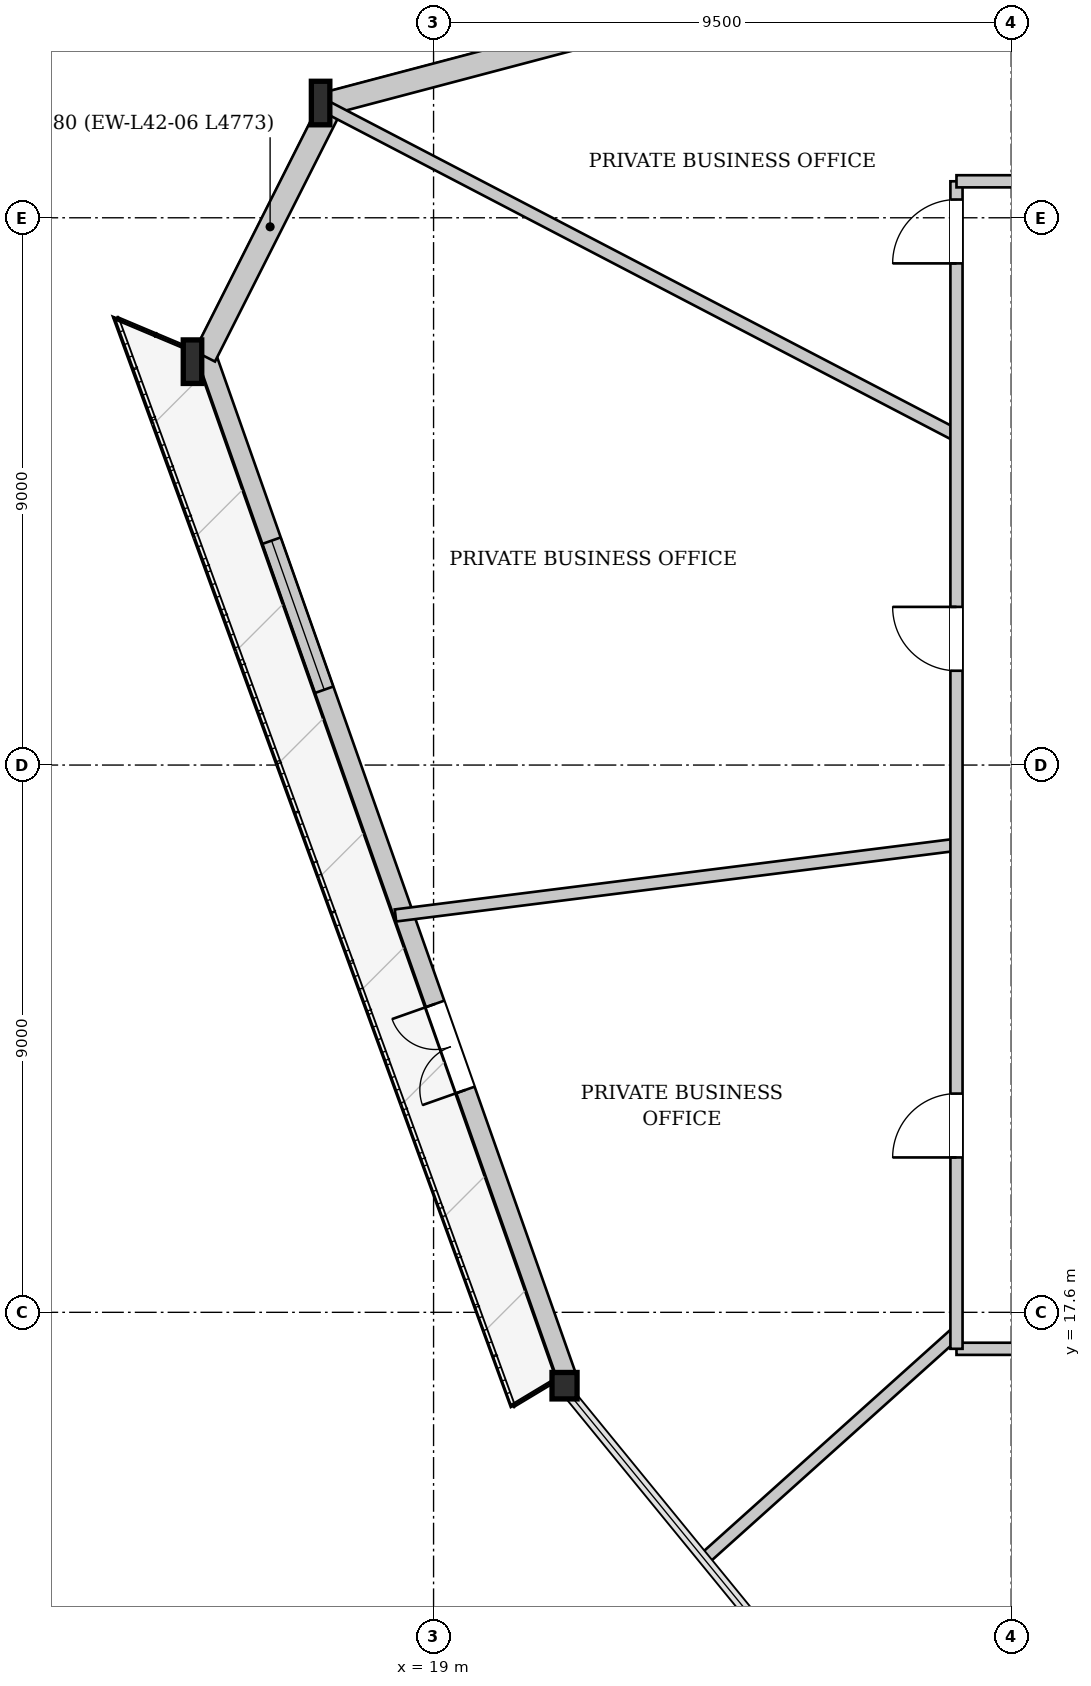
"""IFC4 building model, lengths in metres.
Left out: names, types, materials, properties, quantities, classifications, styles, units other than length and angle.
Written with IfcOpenShell. Run it as: python <this file> out.ifc"""

import sys

from ifc_helpers import new_model, si_unit, direction, frame, frame_2d, origin, origin_2d, place, context, subcontext, project, spatial, rectangle, i_section, extrude, source, transform, mapped, element, fill, save


model = new_model("IFC4")
c1 = context("Model", 3, precision=1e-05, world=origin(), true_north=direction((0.0, 1.0)))
c2 = subcontext(c1, "Body", "Model", "MODEL_VIEW")
j1 = project(units=[si_unit("LENGTHUNIT", "METRE"), si_unit("PLANEANGLEUNIT", "RADIAN")], contexts=[c1])
p1 = place(None, origin())
s1 = spatial("IfcSite", under=j1, at=p1, CompositionType="ELEMENT")
p2 = place(p1, origin())
s2 = spatial("IfcBuilding", under=s1, at=p2, CompositionType="ELEMENT")
p3 = place(p2, frame((0.0, 0.0, 160.8)))
s3 = spatial("IfcBuildingStorey", under=s2, at=p3, CompositionType="ELEMENT", Elevation=160.8)
m1 = source(origin(), c2, "Body", "SweptSolid", [
    extrude(i_section(OverallWidth=0.304, OverallDepth=0.716, WebThickness=0.021, FlangeThickness=0.04, at=origin_2d()), origin(), (0.0, 0.0, 1.0), 3.408),
])
p4 = place(p3, frame((17.218, 37.667, 0.0), z_axis=(-0.044563769491, -0.105964332922, 0.993370842434), x_axis=(0.92179953957, -0.38766687871, 0.0)))
e1 = element("IfcColumn", 1, at=p4, inside=s3, PredefinedType="COLUMN", context=c2, shape_type="MappedRepresentation", body=[
    mapped(m1, transform((0.0, 0.0, 0.0), x_axis=(1.0, 0.0, 0.0), y_axis=(0.0, 1.0, 0.0), z_axis=(0.0, 0.0, 1.0), scale=1.0)),
])
m2 = source(origin(), c2, "Body", "SweptSolid", [
    extrude(i_section(OverallWidth=0.304, OverallDepth=0.716, WebThickness=0.021, FlangeThickness=0.04, at=origin_2d()), origin(), (0.0, 0.0, 1.0), 3.403),
])
p5 = place(p3, frame((15.066, 33.407, 0.0), z_axis=(-0.018149442813, -0.101866437921, 0.994632508292), x_axis=(0.984496060055, -0.17540669239, 0.0)))
e2 = element("IfcColumn", 2, at=p5, inside=s3, PredefinedType="COLUMN", context=c2, shape_type="MappedRepresentation", body=[
    mapped(m2, transform((0.0, 0.0, 0.0), x_axis=(1.0, 0.0, 0.0), y_axis=(0.0, 1.0, 0.0), z_axis=(0.0, 0.0, 1.0), scale=1.0)),
])
m3 = source(origin(), c2, "Body", "SweptSolid", [
    extrude(i_section(OverallWidth=0.412, OverallDepth=0.435, WebThickness=0.031, FlangeThickness=0.05, at=origin_2d()), origin(), (0.0, 0.0, 1.0), 3.401),
])
p6 = place(p3, frame((21.033, 16.502, 0.0), z_axis=(0.071005167008, -0.063753880994, 0.995436441425), x_axis=(0.668091372088, 0.744079242112, 0.0)))
e3 = element("IfcColumn", 3, at=p6, inside=s3, PredefinedType="COLUMN", context=c2, shape_type="MappedRepresentation", body=[
    mapped(m3, transform((0.0, 0.0, 0.0), x_axis=(1.0, 0.0, 0.0), y_axis=(0.0, 1.0, 0.0), z_axis=(0.0, 0.0, 1.0), scale=1.0)),
])
p7 = place(p3, frame((21.184, 16.555, 0.0), z_axis=(0.0, 0.0, 1.0), x_axis=(-0.332843624825, 0.942982036634, 0.0)))
e4 = element("IfcWall", 4, at=p7, inside=s3, PredefinedType="SOLIDWALL", context=c2, shape_type="SweptSolid", body=[
    extrude(rectangle(XDim=17.927, YDim=0.32, at=frame_2d((8.964, 0.0))), origin(), (0.0, 0.0, 1.0), 2.722),
])
p8 = place(p7, frame((4.987, 0.0, 0.0)))
e5 = element("IfcOpeningElement", 5, at=p8, cuts=e4, PredefinedType="OPENING", context=c2, shape_type="SweptSolid", body=[
    extrude(rectangle(XDim=1.5, YDim=2.3, at=frame_2d((0.75, 1.15))), frame((0.0, 0.17, 0.0), z_axis=(0.0, -1.0, 0.0), x_axis=(1.0, 0.0, 0.0)), (0.0, 0.0, 1.0), 0.34),
])
p9 = place(p7, frame((11.966, 0.0, 0.252)))
e6 = element("IfcOpeningElement", 6, at=p9, cuts=e4, PredefinedType="OPENING", context=c2, shape_type="SweptSolid", body=[
    extrude(rectangle(XDim=2.6, YDim=2.35, at=frame_2d((1.3, 1.175))), frame((0.0, 0.17, 0.0), z_axis=(0.0, -1.0, 0.0), x_axis=(1.0, 0.0, 0.0)), (0.0, 0.0, 1.0), 0.34),
])
p10 = place(p3, frame((15.236, 33.321, 0.0), z_axis=(0.0, 0.0, 1.0), x_axis=(0.450831311433, 0.892609169028, 0.0)))
e7 = element("IfcWall", 7, at=p10, inside=s3, PredefinedType="SOLIDWALL", context=c2, shape_type="SweptSolid", body=[
    extrude(rectangle(XDim=4.773, YDim=0.38, at=frame_2d((2.387, 0.0))), origin(), (0.0, 0.0, 1.0), 2.722),
])
p11 = place(p3, frame((17.267, 37.484, 0.0), z_axis=(0.0, 0.0, 1.0), x_axis=(0.966875026681, 0.255250235613, 0.0)))
e8 = element("IfcWall", 8, at=p11, inside=s3, PredefinedType="SOLIDWALL", context=c2, shape_type="SweptSolid", body=[
    extrude(rectangle(XDim=22.923, YDim=0.38, at=frame_2d((11.461, 0.0))), origin(), (0.0, 0.0, 1.0), 2.722),
])
p12 = place(p11, frame((5.318, 0.0, 0.352)))
e9 = element("IfcOpeningElement", 9, at=p12, cuts=e8, PredefinedType="OPENING", context=c2, shape_type="SweptSolid", body=[
    extrude(rectangle(XDim=2.2, YDim=2.25, at=frame_2d((1.1, 1.125))), frame((0.0, 0.2, 0.0), z_axis=(0.0, -1.0, 0.0), x_axis=(1.0, 0.0, 0.0)), (0.0, 0.0, 1.0), 0.4),
])
p13 = place(p11, frame((15.405, 0.0, 0.352)))
e10 = element("IfcOpeningElement", 10, at=p13, cuts=e8, PredefinedType="OPENING", context=c2, shape_type="SweptSolid", body=[
    extrude(rectangle(XDim=2.2, YDim=2.25, at=frame_2d((1.1, 1.125))), frame((0.0, 0.2, 0.0), z_axis=(0.0, -1.0, 0.0), x_axis=(1.0, 0.0, 0.0)), (0.0, 0.0, 1.0), 0.4),
])
p14 = place(p3, frame((27.6, 32.023, 0.0), z_axis=(0.0, 0.0, 1.0), x_axis=(-0.886710795581, 0.462324523468, 0.0)))
e11 = element("IfcWall", 11, at=p14, inside=s3, PredefinedType="PARTITIONING", context=c2, shape_type="SweptSolid", body=[
    extrude(rectangle(XDim=11.783, YDim=0.2, at=frame_2d((5.892, 0.0))), origin(), (0.0, 0.0, 1.0), 2.925),
])
p15 = place(p3, frame((27.6, 25.289, 0.0), z_axis=(0.0, 0.0, 1.0), x_axis=(-0.992150939971, -0.125046040779, 0.0)))
e12 = element("IfcWall", 12, at=p15, inside=s3, PredefinedType="PARTITIONING", context=c2, shape_type="SweptSolid", body=[
    extrude(rectangle(XDim=9.299, YDim=0.2, at=frame_2d((4.65, 0.0))), origin(), (0.0, 0.0, 1.0), 3.33),
])
p16 = place(p3, frame((27.6, 17.267, 0.0), z_axis=(0.0, 0.0, 1.0), x_axis=(-0.744269781278, -0.667879100344, 0.0)))
e13 = element("IfcWall", 13, at=p16, inside=s3, PredefinedType="PARTITIONING", context=c2, shape_type="SweptSolid", body=[
    extrude(rectangle(XDim=5.545, YDim=0.2, at=frame_2d((2.772, 0.0))), origin(), (0.0, 0.0, 1.0), 3.33),
])
p17 = place(p3, frame((27.6, 17.0, 0.0), z_axis=(0.0, 0.0, 1.0), x_axis=(1.0, 0.0, 0.0)))
e14 = element("IfcWall", 14, at=p17, inside=s3, PredefinedType="PARTITIONING", context=c2, shape_type="SweptSolid", body=[
    extrude(rectangle(XDim=20.8, YDim=0.2, at=frame_2d((10.4, 0.0))), origin(), (0.0, 0.0, 1.0), 3.33),
])
p18 = place(p17, frame((2.746, 0.0, 0.0)))
e15 = element("IfcOpeningElement", 15, at=p18, cuts=e14, PredefinedType="OPENING", context=c2, shape_type="SweptSolid", body=[
    extrude(rectangle(XDim=1.05, YDim=2.2, at=frame_2d((0.525, 1.1))), frame((0.0, 0.11, 0.0), z_axis=(0.0, -1.0, 0.0), x_axis=(1.0, 0.0, 0.0)), (0.0, 0.0, 1.0), 0.22),
])
p19 = place(p17, frame((9.339, 0.0, 0.0)))
e16 = element("IfcOpeningElement", 16, at=p19, cuts=e14, PredefinedType="OPENING", context=c2, shape_type="SweptSolid", body=[
    extrude(rectangle(XDim=1.05, YDim=2.2, at=frame_2d((0.525, 1.1))), frame((0.0, 0.11, 0.0), z_axis=(0.0, -1.0, 0.0), x_axis=(1.0, 0.0, 0.0)), (0.0, 0.0, 1.0), 0.22),
])
p20 = place(p17, frame((19.091, 0.0, 0.0)))
e17 = element("IfcOpeningElement", 17, at=p20, cuts=e14, PredefinedType="OPENING", context=c2, shape_type="SweptSolid", body=[
    extrude(rectangle(XDim=1.05, YDim=2.2, at=frame_2d((0.525, 1.1))), frame((0.0, 0.11, 0.0), z_axis=(0.0, -1.0, 0.0), x_axis=(1.0, 0.0, 0.0)), (0.0, 0.0, 1.0), 0.22),
])
p21 = place(p3, frame((27.6, 17.0, 0.0), z_axis=(0.0, 0.0, 1.0), x_axis=(0.0, 1.0, 0.0)))
e18 = element("IfcWall", 18, at=p21, inside=s3, PredefinedType="PARTITIONING", context=c2, shape_type="SweptSolid", body=[
    extrude(rectangle(XDim=19.2, YDim=0.2, at=frame_2d((9.6, 0.0))), origin(), (0.0, 0.0, 1.0), 3.33),
])
p22 = place(p21, frame((17.85, 0.0, 0.0)))
e19 = element("IfcOpeningElement", 19, at=p22, cuts=e18, PredefinedType="OPENING", context=c2, shape_type="SweptSolid", body=[
    extrude(rectangle(XDim=1.05, YDim=2.2, at=frame_2d((0.525, 1.1))), frame((0.0, 0.11, 0.0), z_axis=(0.0, -1.0, 0.0), x_axis=(1.0, 0.0, 0.0)), (0.0, 0.0, 1.0), 0.22),
])
p23 = place(p21, frame((11.151, 0.0, 0.0)))
e20 = element("IfcOpeningElement", 20, at=p23, cuts=e18, PredefinedType="OPENING", context=c2, shape_type="SweptSolid", body=[
    extrude(rectangle(XDim=1.05, YDim=2.2, at=frame_2d((0.525, 1.1))), frame((0.0, 0.11, 0.0), z_axis=(0.0, -1.0, 0.0), x_axis=(1.0, 0.0, 0.0)), (0.0, 0.0, 1.0), 0.22),
])
p24 = place(p21, frame((3.147, 0.0, 0.0)))
e21 = element("IfcOpeningElement", 21, at=p24, cuts=e18, PredefinedType="OPENING", context=c2, shape_type="SweptSolid", body=[
    extrude(rectangle(XDim=1.05, YDim=2.2, at=frame_2d((0.525, 1.1))), frame((0.0, 0.11, 0.0), z_axis=(0.0, -1.0, 0.0), x_axis=(1.0, 0.0, 0.0)), (0.0, 0.0, 1.0), 0.22),
])
p25 = place(p3, frame((27.6, 36.2, 0.0), z_axis=(0.0, 0.0, 1.0), x_axis=(1.0, 0.0, 0.0)))
e22 = element("IfcWall", 22, at=p25, inside=s3, PredefinedType="PARTITIONING", context=c2, shape_type="SweptSolid", body=[
    extrude(rectangle(XDim=13.4, YDim=0.2, at=frame_2d((6.7, 0.0))), origin(), (0.0, 0.0, 1.0), 3.33),
])
p26 = place(p25, frame((7.461, 0.0, 0.0)))
e23 = element("IfcOpeningElement", 23, at=p26, cuts=e22, PredefinedType="OPENING", context=c2, shape_type="SweptSolid", body=[
    extrude(rectangle(XDim=1.05, YDim=2.2, at=frame_2d((0.525, 1.1))), frame((0.0, 0.11, 0.0), z_axis=(0.0, -1.0, 0.0), x_axis=(1.0, 0.0, 0.0)), (0.0, 0.0, 1.0), 0.22),
])
m4 = source(origin(), c2, "Body", "SweptSolid", [
    extrude(rectangle(XDim=1.5, YDim=2.3, at=frame_2d((0.75, 1.15))), frame((0.0, 0.025, 0.0), z_axis=(0.0, -1.0, 0.0), x_axis=(1.0, 0.0, 0.0)), (0.0, 0.0, 1.0), 0.05),
])
p27 = place(p8, origin())
e24 = element("IfcDoor", 24, at=p27, inside=s3, OperationType="DOUBLE_DOOR_SINGLE_SWING", PredefinedType="DOOR", context=c2, shape_type="MappedRepresentation", body=[
    mapped(m4, transform((0.0, 0.0, 0.0), x_axis=(1.0, 0.0, 0.0), y_axis=(0.0, 1.0, 0.0), z_axis=(0.0, 0.0, 1.0), scale=1.0)),
])
fill(e5, e24)
m5 = source(origin(), c2, "Body", "SweptSolid", [
    extrude(rectangle(XDim=2.6, YDim=2.35, at=frame_2d((1.3, 1.175))), frame((0.0, 0.03, 0.0), z_axis=(0.0, -1.0, 0.0), x_axis=(1.0, 0.0, 0.0)), (0.0, 0.0, 1.0), 0.06),
])
p28 = place(p9, origin())
e25 = element("IfcWindow", 25, at=p28, inside=s3, PartitioningType="SINGLE_PANEL", PredefinedType="WINDOW", context=c2, shape_type="MappedRepresentation", body=[
    mapped(m5, transform((0.0, 0.0, 0.0), x_axis=(1.0, 0.0, 0.0), y_axis=(0.0, 1.0, 0.0), z_axis=(0.0, 0.0, 1.0), scale=1.0)),
])
fill(e6, e25)
m6 = source(origin(), c2, "Body", "SweptSolid", [
    extrude(rectangle(XDim=1.05, YDim=2.2, at=frame_2d((0.525, 1.1))), frame((0.0, 0.025, 0.0), z_axis=(0.0, -1.0, 0.0), x_axis=(1.0, 0.0, 0.0)), (0.0, 0.0, 1.0), 0.05),
])
p29 = place(p22, origin())
e26 = element("IfcDoor", 26, at=p29, inside=s3, OperationType="SINGLE_SWING_LEFT", PredefinedType="DOOR", context=c2, shape_type="MappedRepresentation", body=[
    mapped(m6, transform((0.0, 0.0, 0.0), x_axis=(1.0, 0.0, 0.0), y_axis=(0.0, 1.0, 0.0), z_axis=(0.0, 0.0, 1.0), scale=1.0)),
])
fill(e19, e26)
p30 = place(p23, origin())
e27 = element("IfcDoor", 27, at=p30, inside=s3, OperationType="SINGLE_SWING_RIGHT", PredefinedType="DOOR", context=c2, shape_type="MappedRepresentation", body=[
    mapped(m6, transform((0.0, 0.0, 0.0), x_axis=(1.0, 0.0, 0.0), y_axis=(0.0, 1.0, 0.0), z_axis=(0.0, 0.0, 1.0), scale=1.0)),
])
fill(e20, e27)
p31 = place(p24, origin())
e28 = element("IfcDoor", 28, at=p31, inside=s3, OperationType="SINGLE_SWING_LEFT", PredefinedType="DOOR", context=c2, shape_type="MappedRepresentation", body=[
    mapped(m6, transform((0.0, 0.0, 0.0), x_axis=(1.0, 0.0, 0.0), y_axis=(0.0, 1.0, 0.0), z_axis=(0.0, 0.0, 1.0), scale=1.0)),
])
fill(e21, e28)
save(model, sys.argv[1])
